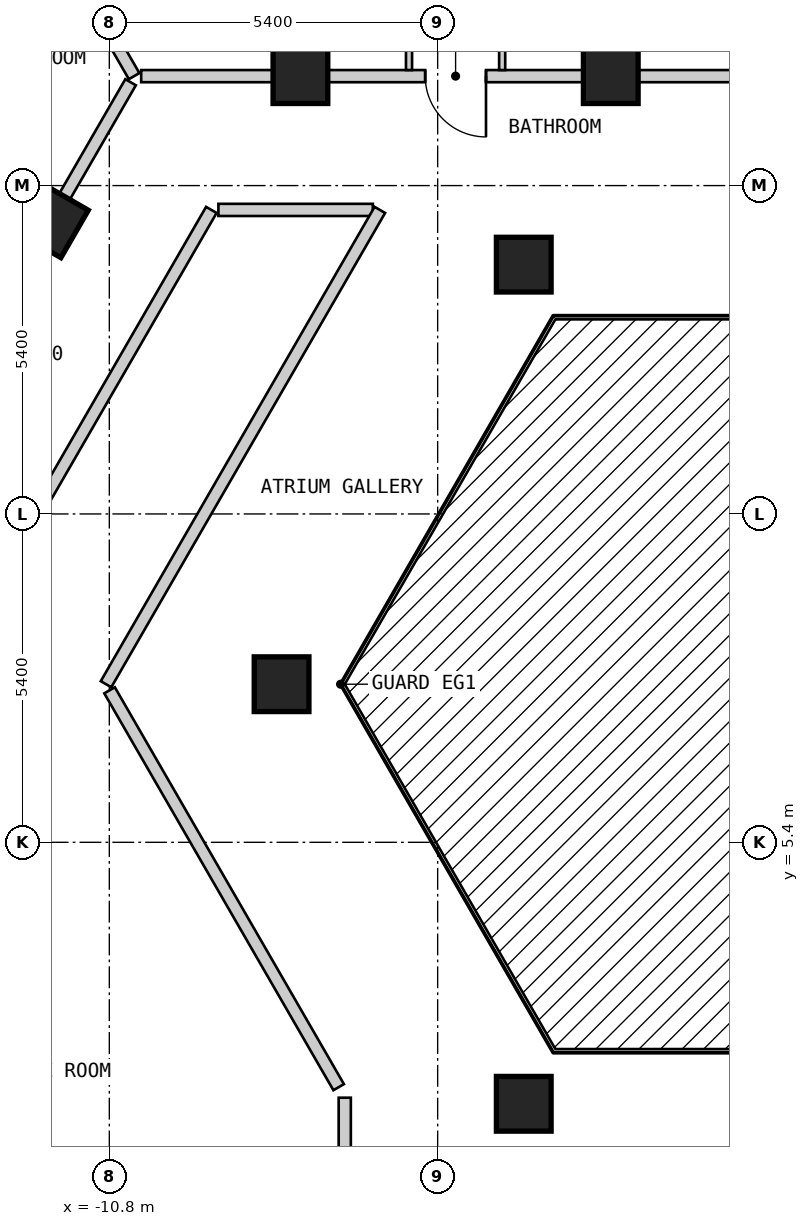
"""IFC4 building model, lengths in metres.
Left out: names, types, materials, properties, quantities, classifications, styles, units other than length and angle.
Written with IfcOpenShell. Run it as: python <this file> out.ifc"""

import sys

from ifc_helpers import new_model, si_unit, direction, frame, frame_2d, origin, origin_2d, place, context, subcontext, project, spatial, rectangle, extrude, element, fill, save


model = new_model("IFC4")
c1 = context("Model", 3, precision=1e-05, world=origin(), true_north=direction((0.0, 1.0)))
c2 = subcontext(c1, "Body", "Model", "MODEL_VIEW")
j1 = project(units=[si_unit("LENGTHUNIT", "METRE"), si_unit("PLANEANGLEUNIT", "RADIAN")], contexts=[c1])
p1 = place(None, origin())
s1 = spatial("IfcSite", under=j1, at=p1, CompositionType="ELEMENT")
p2 = place(p1, origin())
s2 = spatial("IfcBuilding", under=s1, at=p2, CompositionType="ELEMENT")
p3 = place(p2, frame((0.0, 0.0, 56.4)))
s3 = spatial("IfcBuildingStorey", under=s2, at=p3, CompositionType="ELEMENT", Elevation=56.4)
for number, where, z_axis, x_axis in (
    (1, (-2.553, 18.0, 0.0), (0.0, 0.0, 1.0), (-1.0, 0.0, 0.0)),
    (2, (-3.984, 14.9, 0.0), (0.0, 0.0, 1.0), (1.0, 0.0, 0.0)),
    (3, (-7.657, 18.0, 0.0), (0.0, 0.0, 1.0), (-1.0, 0.0, 0.0)),
    (4, (-11.761, 15.63, 0.0), (0.0, 0.0, 1.0), (-0.5, -0.866, 0.0)),
    (5, (-7.967, 8.0, 0.0), (0.0, 0.0, 1.0), (1.0, 0.0, 0.0)),
    (6, (-3.984, 1.1, 0.0), (0.0, 0.0, 1.0), (1.0, 0.0, 0.0)),
):
    element("IfcColumn", number, at=place(p3, frame(where, z_axis=z_axis, x_axis=x_axis)), inside=s3, PredefinedType="COLUMN", context=c2, shape_type="SweptSolid", body=[
        extrude(rectangle(XDim=0.9, YDim=0.9, at=origin_2d()), origin(), (0.0, 0.0, 1.0), 3.0),
    ])
p4 = place(p3, frame((-10.796, 7.9, 0.0), z_axis=(0.0, 0.0, 1.0), x_axis=(0.499954271211, -0.866051803703, 0.0)))
e7 = element("IfcWall", 7, at=p4, inside=s3, PredefinedType="PARTITIONING", context=c2, shape_type="SweptSolid", body=[
    extrude(rectangle(XDim=7.536, YDim=0.2, at=frame_2d((3.768, 0.0))), origin(), (0.0, 0.0, 1.0), 2.7),
])
p5 = place(p3, frame((-9.006, 15.8, 0.0), z_axis=(0.0, 0.0, 1.0), x_axis=(1.0, 0.0, 0.0)))
e8 = element("IfcWall", 8, at=p5, inside=s3, PredefinedType="PARTITIONING", context=c2, shape_type="SweptSolid", body=[
    extrude(rectangle(XDim=2.54, YDim=0.2, at=frame_2d((1.27, 0.0))), origin(), (0.0, 0.0, 1.0), 2.7),
])
p6 = place(p3, frame((-10.276, 18.0, 0.0), z_axis=(0.0, 0.0, 1.0), x_axis=(1.0, 0.0, 0.0)))
e9 = element("IfcWall", 9, at=p6, inside=s3, PredefinedType="PARTITIONING", context=c2, shape_type="SweptSolid", body=[
    extrude(rectangle(XDim=20.553, YDim=0.2, at=frame_2d((10.276, 0.0))), origin(), (0.0, 0.0, 1.0), 2.7),
])
p7 = place(p6, frame((14.879, 0.0, 0.0)))
e10 = element("IfcOpeningElement", 10, at=p7, cuts=e9, PredefinedType="OPENING", context=c2, shape_type="SweptSolid", body=[
    extrude(rectangle(XDim=1.0, YDim=2.1, at=frame_2d((0.5, 1.05))), frame((0.0, 0.11, 0.0), z_axis=(0.0, -1.0, 0.0), x_axis=(1.0, 0.0, 0.0)), (0.0, 0.0, 1.0), 0.22),
])
p8 = place(p6, frame((4.671, 0.0, 0.0)))
e11 = element("IfcOpeningElement", 11, at=p8, cuts=e9, PredefinedType="OPENING", context=c2, shape_type="SweptSolid", body=[
    extrude(rectangle(XDim=1.0, YDim=2.1, at=frame_2d((0.5, 1.05))), frame((0.0, 0.11, 0.0), z_axis=(0.0, -1.0, 0.0), x_axis=(1.0, 0.0, 0.0)), (0.0, 0.0, 1.0), 0.22),
])
p9 = place(p3, frame((-10.854, 8.0, 0.0), z_axis=(0.0, 0.0, 1.0), x_axis=(0.499964141897, 0.86604610548, 0.0)))
e12 = element("IfcWall", 12, at=p9, inside=s3, PredefinedType="PARTITIONING", context=c2, shape_type="SweptSolid", body=[
    extrude(rectangle(XDim=9.007, YDim=0.2, at=frame_2d((4.503, 0.0))), origin(), (0.0, 0.0, 1.0), 2.7),
])
p10 = place(p3, frame((-18.244, -0.001, 0.0), z_axis=(0.0, 0.0, 1.0), x_axis=(0.499962999376, 0.866046765051, 0.0)))
e13 = element("IfcWall", 13, at=p10, inside=s3, PredefinedType="PARTITIONING", context=c2, shape_type="SweptSolid", body=[
    extrude(rectangle(XDim=18.245, YDim=0.2, at=frame_2d((9.123, 0.0))), origin(), (0.0, 0.0, 1.0), 2.7),
])
p11 = place(p10, frame((8.672, 0.0, 0.0)))
e14 = element("IfcOpeningElement", 14, at=p11, cuts=e13, PredefinedType="OPENING", context=c2, shape_type="SweptSolid", body=[
    extrude(rectangle(XDim=0.9, YDim=2.1, at=frame_2d((0.45, 1.05))), frame((0.0, 0.11, 0.0), z_axis=(0.0, -1.0, 0.0), x_axis=(1.0, 0.0, 0.0)), (0.0, 0.0, 1.0), 0.22),
])
p12 = place(p3, frame((-20.727, 0.099, 0.0), z_axis=(0.0, 0.0, 1.0), x_axis=(0.499993204491, 0.866029327138, 0.0)))
e15 = element("IfcWall", 15, at=p12, inside=s3, PredefinedType="PARTITIONING", context=c2, shape_type="SweptSolid", body=[
    extrude(rectangle(XDim=20.554, YDim=0.2, at=frame_2d((10.277, 0.0))), origin(), (0.0, 0.0, 1.0), 2.7),
])
p13 = place(p12, frame((9.776, 0.0, 0.0)))
e16 = element("IfcOpeningElement", 16, at=p13, cuts=e15, PredefinedType="OPENING", context=c2, shape_type="SweptSolid", body=[
    extrude(rectangle(XDim=1.0, YDim=2.1, at=frame_2d((0.5, 1.05))), frame((0.0, 0.11, 0.0), z_axis=(0.0, -1.0, 0.0), x_axis=(1.0, 0.0, 0.0)), (0.0, 0.0, 1.0), 0.22),
])
p14 = place(p12, frame((4.673, 0.0, 0.0)))
e17 = element("IfcOpeningElement", 17, at=p14, cuts=e15, PredefinedType="OPENING", context=c2, shape_type="SweptSolid", body=[
    extrude(rectangle(XDim=1.0, YDim=2.1, at=frame_2d((0.5, 1.05))), frame((0.0, 0.11, 0.0), z_axis=(0.0, -1.0, 0.0), x_axis=(1.0, 0.0, 0.0)), (0.0, 0.0, 1.0), 0.22),
])
p15 = place(p12, frame((14.88, 0.0, 0.0)))
e18 = element("IfcOpeningElement", 18, at=p15, cuts=e15, PredefinedType="OPENING", context=c2, shape_type="SweptSolid", body=[
    extrude(rectangle(XDim=1.0, YDim=2.1, at=frame_2d((0.5, 1.05))), frame((0.0, 0.11, 0.0), z_axis=(0.0, -1.0, 0.0), x_axis=(1.0, 0.0, 0.0)), (0.0, 0.0, 1.0), 0.22),
])
p16 = place(p3, frame((-6.928, -2.8, 0.0), z_axis=(0.0, 0.0, 1.0), x_axis=(0.0, 1.0, 0.0)))
e19 = element("IfcWall", 19, at=p16, inside=s3, PredefinedType="PARTITIONING", context=c2, shape_type="SweptSolid", body=[
    extrude(rectangle(XDim=4.0, YDim=0.2, at=frame_2d((2.0, 0.0))), origin(), (0.0, 0.0, 1.0), 2.7),
])
p17 = place(p3, frame((-7.657, 21.844, 0.0), z_axis=(0.0, 0.0, 1.0), x_axis=(0.0, -1.0, 0.0)))
e20 = element("IfcWall", 20, at=p17, inside=s3, PredefinedType="PARTITIONING", context=c2, shape_type="SweptSolid", body=[
    extrude(rectangle(XDim=3.744, YDim=0.1, at=frame_2d((1.872, 0.0))), origin(), (0.0, 0.0, 1.0), 2.7),
])
p18 = place(p3, frame((-4.339, 18.1, 0.0), z_axis=(0.0, 0.0, 1.0), x_axis=(0.0, 1.0, 0.0)))
e21 = element("IfcWall", 21, at=p18, inside=s3, PredefinedType="PARTITIONING", context=c2, shape_type="SweptSolid", body=[
    extrude(rectangle(XDim=2.51, YDim=0.1, at=frame_2d((1.255, 0.0))), origin(), (0.0, 0.0, 1.0), 2.7),
])
p19 = place(p18, frame((0.83, 0.0, 0.0)))
e22 = element("IfcOpeningElement", 22, at=p19, cuts=e21, PredefinedType="OPENING", context=c2, shape_type="SweptSolid", body=[
    extrude(rectangle(XDim=0.8, YDim=2.1, at=frame_2d((0.4, 1.05))), frame((0.0, 0.06, 0.0), z_axis=(0.0, -1.0, 0.0), x_axis=(1.0, 0.0, 0.0)), (0.0, 0.0, 1.0), 0.12),
])
p20 = place(p3, frame((-5.871, 18.1, 0.0), z_axis=(0.0, 0.0, 1.0), x_axis=(0.0, 1.0, 0.0)))
e23 = element("IfcWall", 23, at=p20, inside=s3, PredefinedType="PARTITIONING", context=c2, shape_type="SweptSolid", body=[
    extrude(rectangle(XDim=2.559, YDim=0.1, at=frame_2d((1.279, 0.0))), origin(), (0.0, 0.0, 1.0), 2.7),
])
p21 = place(p20, frame((0.78, 0.0, 0.0)))
e24 = element("IfcOpeningElement", 24, at=p21, cuts=e23, PredefinedType="OPENING", context=c2, shape_type="SweptSolid", body=[
    extrude(rectangle(XDim=0.9, YDim=2.1, at=frame_2d((0.45, 1.05))), frame((0.0, 0.06, 0.0), z_axis=(0.0, -1.0, 0.0), x_axis=(1.0, 0.0, 0.0)), (0.0, 0.0, 1.0), 0.12),
])
p22 = place(p3, frame((-12.629, 21.874, 0.0), z_axis=(0.0, 0.0, 1.0), x_axis=(0.500024801635, -0.86601108408, 0.0)))
e25 = element("IfcWall", 25, at=p22, inside=s3, PredefinedType="PARTITIONING", context=c2, shape_type="SweptSolid", body=[
    extrude(rectangle(XDim=4.473, YDim=0.2, at=frame_2d((2.237, 0.0))), origin(), (0.0, 0.0, 1.0), 2.7),
])
p23 = place(p3, frame((-2.553, 18.1, 0.0), z_axis=(0.0, 0.0, 1.0), x_axis=(0.0, 1.0, 0.0)))
e26 = element("IfcWall", 26, at=p23, inside=s3, PredefinedType="PARTITIONING", context=c2, shape_type="SweptSolid", body=[
    extrude(rectangle(XDim=10.0, YDim=0.2, at=frame_2d((5.0, 0.0))), origin(), (0.0, 0.0, 1.0), 2.7),
])
p24 = place(p8, origin())
e27 = element("IfcDoor", 27, at=p24, inside=s3, OperationType="SINGLE_SWING_RIGHT", PredefinedType="DOOR", context=c2, shape_type="SweptSolid", body=[
    extrude(rectangle(XDim=1.0, YDim=2.1, at=frame_2d((0.5, 1.05))), frame((0.0, 0.025, 0.0), z_axis=(0.0, -1.0, 0.0), x_axis=(1.0, 0.0, 0.0)), (0.0, 0.0, 1.0), 0.05),
])
fill(e11, e27)
save(model, sys.argv[1])
